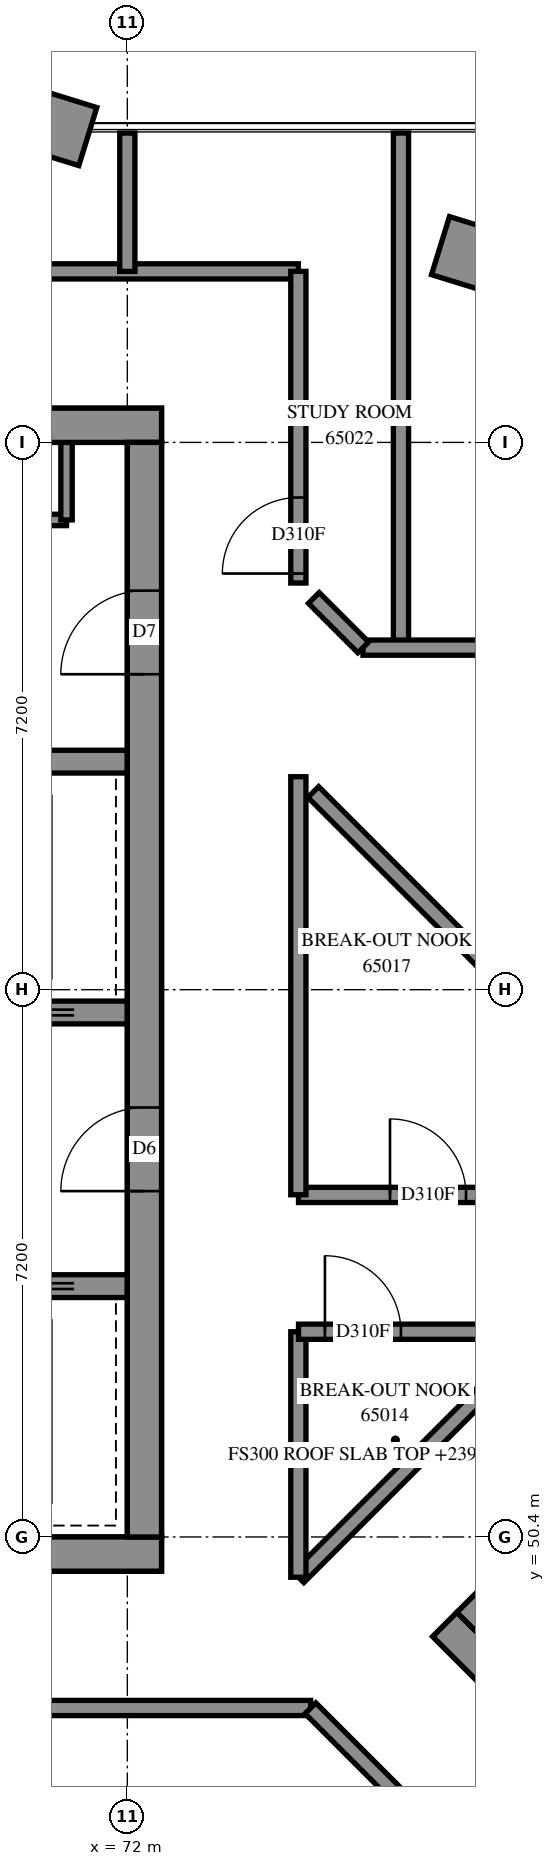
"""IFC4 building model, lengths in metres.
Left out: names, types, materials, properties, quantities, classifications, styles, units other than length and angle.
Written with IfcOpenShell. Run it as: python <this file> out.ifc"""

import sys

from ifc_helpers import new_model, si_unit, direction, frame, frame_2d, origin, place, context, subcontext, project, spatial, rectangle, extrude, element, fill, save


model = new_model("IFC4")
c1 = context("Model", 3, precision=1e-05, world=origin(), true_north=direction((0.0, 1.0)))
c2 = subcontext(c1, "Body", "Model", "MODEL_VIEW")
j1 = project(units=[si_unit("LENGTHUNIT", "METRE"), si_unit("PLANEANGLEUNIT", "RADIAN")], contexts=[c1])
p1 = place(None, origin())
s1 = spatial("IfcSite", under=j1, at=p1, CompositionType="ELEMENT")
p2 = place(p1, origin())
s2 = spatial("IfcBuilding", under=s1, at=p2, CompositionType="ELEMENT")
p3 = place(p2, frame((0.0, 0.0, 239.6)))
s3 = spatial("IfcBuildingStorey", under=s2, at=p3, CompositionType="ELEMENT", Elevation=239.6)
p4 = place(p3, frame((57.15, 50.175, -0.3), z_axis=(0.0, 0.0, 1.0), x_axis=(1.0, 0.0, 0.0)))
e1 = element("IfcWall", 1, at=p4, inside=s3, PredefinedType="SHEAR", context=c2, shape_type="SweptSolid", body=[
    extrude(rectangle(XDim=15.3, YDim=0.45, at=frame_2d((7.65, 0.0))), origin(), (0.0, 0.0, 1.0), 3.5),
])
p5 = place(p3, frame((57.15, 65.025, -0.3), z_axis=(0.0, 0.0, 1.0), x_axis=(1.0, 0.0, 0.0)))
e2 = element("IfcWall", 2, at=p5, inside=s3, PredefinedType="SHEAR", context=c2, shape_type="SweptSolid", body=[
    extrude(rectangle(XDim=15.3, YDim=0.45, at=frame_2d((7.65, 0.0))), origin(), (0.0, 0.0, 1.0), 3.5),
])
p6 = place(p5, frame((10.45, 0.0, 0.3)))
e3 = element("IfcOpeningElement", 3, at=p6, cuts=e2, PredefinedType="OPENING", context=c2, shape_type="SweptSolid", body=[
    extrude(rectangle(XDim=0.8, YDim=2.1, at=frame_2d((0.4, 1.05))), frame((0.0, 0.235, 0.0), z_axis=(0.0, -1.0, 0.0), x_axis=(1.0, 0.0, 0.0)), (0.0, 0.0, 1.0), 0.47),
])
p7 = place(p3, frame((72.225, 50.4, -0.3), z_axis=(0.0, 0.0, 1.0), x_axis=(0.0, 1.0, 0.0)))
e4 = element("IfcWall", 4, at=p7, inside=s3, PredefinedType="SHEAR", context=c2, shape_type="SweptSolid", body=[
    extrude(rectangle(XDim=14.4, YDim=0.45, at=frame_2d((7.2, 0.0))), origin(), (0.0, 0.0, 1.0), 3.5),
])
p8 = place(p7, frame((4.55, 0.0, 0.3)))
e5 = element("IfcOpeningElement", 5, at=p8, cuts=e4, PredefinedType="OPENING", context=c2, shape_type="SweptSolid", body=[
    extrude(rectangle(XDim=1.1, YDim=2.1, at=frame_2d((0.55, 1.05))), frame((0.0, 0.235, 0.0), z_axis=(0.0, -1.0, 0.0), x_axis=(1.0, 0.0, 0.0)), (0.0, 0.0, 1.0), 0.47),
])
p9 = place(p7, frame((11.35, 0.0, 0.3)))
e6 = element("IfcOpeningElement", 6, at=p9, cuts=e4, PredefinedType="OPENING", context=c2, shape_type="SweptSolid", body=[
    extrude(rectangle(XDim=1.1, YDim=2.1, at=frame_2d((0.55, 1.05))), frame((0.0, 0.235, 0.0), z_axis=(0.0, -1.0, 0.0), x_axis=(1.0, 0.0, 0.0)), (0.0, 0.0, 1.0), 0.47),
])
p10 = place(p3, frame((57.6, 53.7, 0.0), z_axis=(0.0, 0.0, 1.0), x_axis=(1.0, 0.0, 0.0)))
e7 = element("IfcWall", 7, at=p10, inside=s3, PredefinedType="SOLIDWALL", context=c2, shape_type="SweptSolid", body=[
    extrude(rectangle(XDim=14.4, YDim=0.3, at=frame_2d((7.2, 0.0))), origin(), (0.0, 0.0, 1.0), 3.9),
])
p11 = place(p10, frame((1.35, 0.0, 0.0)))
e8 = element("IfcOpeningElement", 8, at=p11, cuts=e7, PredefinedType="OPENING", context=c2, shape_type="SweptSolid", body=[
    extrude(rectangle(XDim=0.9, YDim=2.1, at=frame_2d((0.45, 1.05))), frame((0.0, 0.16, 0.0), z_axis=(0.0, -1.0, 0.0), x_axis=(1.0, 0.0, 0.0)), (0.0, 0.0, 1.0), 0.32),
])
p12 = place(p10, frame((4.95, 0.0, 0.0)))
e9 = element("IfcOpeningElement", 9, at=p12, cuts=e7, PredefinedType="OPENING", context=c2, shape_type="SweptSolid", body=[
    extrude(rectangle(XDim=0.9, YDim=2.1, at=frame_2d((0.45, 1.05))), frame((0.0, 0.16, 0.0), z_axis=(0.0, -1.0, 0.0), x_axis=(1.0, 0.0, 0.0)), (0.0, 0.0, 1.0), 0.32),
])
p13 = place(p10, frame((8.55, 0.0, 0.0)))
e10 = element("IfcOpeningElement", 10, at=p13, cuts=e7, PredefinedType="OPENING", context=c2, shape_type="SweptSolid", body=[
    extrude(rectangle(XDim=0.9, YDim=2.1, at=frame_2d((0.45, 1.05))), frame((0.0, 0.16, 0.0), z_axis=(0.0, -1.0, 0.0), x_axis=(1.0, 0.0, 0.0)), (0.0, 0.0, 1.0), 0.32),
])
p14 = place(p10, frame((12.05, 0.0, 0.0)))
e11 = element("IfcOpeningElement", 11, at=p14, cuts=e7, PredefinedType="OPENING", context=c2, shape_type="SweptSolid", body=[
    extrude(rectangle(XDim=1.1, YDim=2.1, at=frame_2d((0.55, 1.05))), frame((0.0, 0.16, 0.0), z_axis=(0.0, -1.0, 0.0), x_axis=(1.0, 0.0, 0.0)), (0.0, 0.0, 1.0), 0.32),
])
p15 = place(p3, frame((57.6, 57.3, 0.0), z_axis=(0.0, 0.0, 1.0), x_axis=(1.0, 0.0, 0.0)))
e12 = element("IfcWall", 12, at=p15, inside=s3, PredefinedType="SOLIDWALL", context=c2, shape_type="SweptSolid", body=[
    extrude(rectangle(XDim=14.4, YDim=0.3, at=frame_2d((7.2, 0.0))), origin(), (0.0, 0.0, 1.0), 3.9),
])
p16 = place(p15, frame((1.25, 0.0, 0.0)))
e13 = element("IfcOpeningElement", 13, at=p16, cuts=e12, PredefinedType="OPENING", context=c2, shape_type="SweptSolid", body=[
    extrude(rectangle(XDim=1.1, YDim=2.1, at=frame_2d((0.55, 1.05))), frame((0.0, 0.16, 0.0), z_axis=(0.0, -1.0, 0.0), x_axis=(1.0, 0.0, 0.0)), (0.0, 0.0, 1.0), 0.32),
])
p17 = place(p15, frame((4.85, 0.0, 0.0)))
e14 = element("IfcOpeningElement", 14, at=p17, cuts=e12, PredefinedType="OPENING", context=c2, shape_type="SweptSolid", body=[
    extrude(rectangle(XDim=1.1, YDim=2.1, at=frame_2d((0.55, 1.05))), frame((0.0, 0.16, 0.0), z_axis=(0.0, -1.0, 0.0), x_axis=(1.0, 0.0, 0.0)), (0.0, 0.0, 1.0), 0.32),
])
p18 = place(p15, frame((12.05, 0.0, 0.0)))
e15 = element("IfcOpeningElement", 15, at=p18, cuts=e12, PredefinedType="OPENING", context=c2, shape_type="SweptSolid", body=[
    extrude(rectangle(XDim=1.1, YDim=2.1, at=frame_2d((0.55, 1.05))), frame((0.0, 0.16, 0.0), z_axis=(0.0, -1.0, 0.0), x_axis=(1.0, 0.0, 0.0)), (0.0, 0.0, 1.0), 0.32),
])
p19 = place(p3, frame((64.8, 60.6, 0.0), z_axis=(0.0, 0.0, 1.0), x_axis=(1.0, 0.0, 0.0)))
e16 = element("IfcWall", 16, at=p19, inside=s3, PredefinedType="SOLIDWALL", context=c2, shape_type="SweptSolid", body=[
    extrude(rectangle(XDim=7.2, YDim=0.3, at=frame_2d((3.6, 0.0))), origin(), (0.0, 0.0, 1.0), 3.9),
])
p20 = place(p3, frame((76.177, 49.249, -0.3), z_axis=(0.0, 0.0, 1.0), x_axis=(0.7071100491, -0.7071035132, 0.0)))
e17 = element("IfcWall", 17, at=p20, inside=s3, PredefinedType="SHEAR", context=c2, shape_type="SweptSolid", body=[
    extrude(rectangle(XDim=15.3, YDim=0.45, at=frame_2d((7.65, 0.0))), origin(), (0.0, 0.0, 1.0), 3.5),
])
p21 = place(p3, frame((76.495, 49.249, -0.3), z_axis=(0.0, 0.0, 1.0), x_axis=(0.7071067812, 0.7071067812, 0.0)))
e18 = element("IfcWall", 18, at=p21, inside=s3, PredefinedType="SHEAR", context=c2, shape_type="SweptSolid", body=[
    extrude(rectangle(XDim=14.4, YDim=0.45, at=frame_2d((7.2, 0.0))), origin(), (0.0, 0.0, 1.0), 3.5),
])
p22 = place(p21, frame((4.55, 0.0, 0.3)))
e19 = element("IfcOpeningElement", 19, at=p22, cuts=e18, PredefinedType="OPENING", context=c2, shape_type="SweptSolid", body=[
    extrude(rectangle(XDim=1.1, YDim=2.1, at=frame_2d((0.55, 1.05))), frame((0.0, 0.235, 0.0), z_axis=(0.0, -1.0, 0.0), x_axis=(1.0, 0.0, 0.0)), (0.0, 0.0, 1.0), 0.47),
])
p23 = place(p21, frame((11.35, 0.0, 0.3)))
e20 = element("IfcOpeningElement", 20, at=p23, cuts=e18, PredefinedType="OPENING", context=c2, shape_type="SweptSolid", body=[
    extrude(rectangle(XDim=1.1, YDim=2.1, at=frame_2d((0.55, 1.05))), frame((0.0, 0.235, 0.0), z_axis=(0.0, -1.0, 0.0), x_axis=(1.0, 0.0, 0.0)), (0.0, 0.0, 1.0), 0.47),
])
p24 = place(p3, frame((78.024, 66.8, 0.0), z_axis=(0.0, 0.0, 1.0), x_axis=(-0.9553580919, 0.2954503618, 0.0)))
e21 = element("IfcWall", 21, at=p24, inside=s3, PredefinedType="SOLIDWALL", context=c2, shape_type="SweptSolid", body=[
    extrude(rectangle(XDim=1.993, YDim=0.8, at=frame_2d((0.996, 0.0))), origin(), (0.0, 0.0, 1.0), 0.65),
])
p25 = place(p3, frame((71.48, 68.824, 0.0), z_axis=(0.0, 0.0, 1.0), x_axis=(-0.9553587294, 0.2954483004, 0.0)))
e22 = element("IfcWall", 22, at=p25, inside=s3, PredefinedType="SOLIDWALL", context=c2, shape_type="SweptSolid", body=[
    extrude(rectangle(XDim=4.919, YDim=0.8, at=frame_2d((2.46, 0.0))), origin(), (0.0, 0.0, 1.0), 0.65),
])
p26 = place(p3, frame((64.95, 63.78, 0.0), z_axis=(0.0, 0.0, 1.0), x_axis=(1.0, 0.0, 0.0)))
e23 = element("IfcWall", 23, at=p26, inside=s3, PredefinedType="PARTITIONING", context=c2, shape_type="SweptSolid", body=[
    extrude(rectangle(XDim=6.25, YDim=0.15, at=frame_2d((3.125, 0.0))), origin(), (0.0, 0.0, 1.0), 3.9),
])
p27 = place(p3, frame((71.2, 63.78, 0.0), z_axis=(0.0, 0.0, 1.0), x_axis=(0.0, 1.0, 0.0)))
e24 = element("IfcWall", 24, at=p27, inside=s3, PredefinedType="PARTITIONING", context=c2, shape_type="SweptSolid", body=[
    extrude(rectangle(XDim=1.02, YDim=0.15, at=frame_2d((0.51, 0.0))), origin(), (0.0, 0.0, 1.0), 3.9),
])
p28 = place(p3, frame((55.352, 48.15, 0.0), z_axis=(0.0, 0.0, 1.0), x_axis=(1.0, 0.0, 0.0)))
e25 = element("IfcWall", 25, at=p28, inside=s3, PredefinedType="PARTITIONING", context=c2, shape_type="SweptSolid", body=[
    extrude(rectangle(XDim=19.06, YDim=0.2, at=frame_2d((9.53, 0.0))), origin(), (0.0, 0.0, 1.0), 3.9),
])
p29 = place(p28, frame((11.608, 0.0, 0.0)))
e26 = element("IfcOpeningElement", 26, at=p29, cuts=e25, PredefinedType="OPENING", context=c2, shape_type="SweptSolid", body=[
    extrude(rectangle(XDim=1.0, YDim=2.1, at=frame_2d((0.5, 1.05))), frame((0.0, 0.11, 0.0), z_axis=(0.0, -1.0, 0.0), x_axis=(1.0, 0.0, 0.0)), (0.0, 0.0, 1.0), 0.22),
])
p30 = place(p3, frame((55.35, 67.05, 0.0), z_axis=(0.0, 0.0, 1.0), x_axis=(1.0, 0.0, 0.0)))
e27 = element("IfcWall", 27, at=p30, inside=s3, PredefinedType="PARTITIONING", context=c2, shape_type="SweptSolid", body=[
    extrude(rectangle(XDim=18.9, YDim=0.2, at=frame_2d((9.45, 0.0))), origin(), (0.0, 0.0, 1.0), 3.9),
])
p31 = place(p30, frame((9.733, 0.0, 0.0)))
e28 = element("IfcOpeningElement", 28, at=p31, cuts=e27, PredefinedType="OPENING", context=c2, shape_type="SweptSolid", body=[
    extrude(rectangle(XDim=1.0, YDim=2.1, at=frame_2d((0.5, 1.05))), frame((0.0, 0.11, 0.0), z_axis=(0.0, -1.0, 0.0), x_axis=(1.0, 0.0, 0.0)), (0.0, 0.0, 1.0), 0.22),
])
p32 = place(p3, frame((75.6, 62.1, 0.0), z_axis=(0.0, 0.0, 1.0), x_axis=(0.0, 1.0, 0.0)))
e29 = element("IfcWall", 29, at=p32, inside=s3, PredefinedType="PARTITIONING", context=c2, shape_type="SweptSolid", body=[
    extrude(rectangle(XDim=6.77, YDim=0.2, at=frame_2d((3.385, 0.0))), origin(), (0.0, 0.0, 1.0), 3.9),
])
p33 = place(p3, frame((74.252, 54.9, 0.0), z_axis=(0.0, 0.0, 1.0), x_axis=(1.0, 0.0, 0.0)))
e30 = element("IfcWall", 30, at=p33, inside=s3, PredefinedType="PARTITIONING", context=c2, shape_type="SweptSolid", body=[
    extrude(rectangle(XDim=5.5, YDim=0.2, at=frame_2d((2.75, 0.0))), origin(), (0.0, 0.0, 1.0), 3.9),
])
p34 = place(p33, frame((1.204, 0.0, 0.0)))
e31 = element("IfcOpeningElement", 31, at=p34, cuts=e30, PredefinedType="OPENING", context=c2, shape_type="SweptSolid", body=[
    extrude(rectangle(XDim=1.0, YDim=2.1, at=frame_2d((0.5, 1.05))), frame((0.0, 0.11, 0.0), z_axis=(0.0, -1.0, 0.0), x_axis=(1.0, 0.0, 0.0)), (0.0, 0.0, 1.0), 0.22),
])
p35 = place(p3, frame((74.25, 54.902, 0.0), z_axis=(0.0, 0.0, 1.0), x_axis=(0.0, 1.0, 0.0)))
e32 = element("IfcWall", 32, at=p35, inside=s3, PredefinedType="PARTITIONING", context=c2, shape_type="SweptSolid", body=[
    extrude(rectangle(XDim=5.5, YDim=0.2, at=frame_2d((2.75, 0.0))), origin(), (0.0, 0.0, 1.0), 3.9),
])
p36 = place(p3, frame((74.251, 49.87, 0.0), z_axis=(0.0, 0.0, 1.0), x_axis=(0.7071067812, 0.7071067812, 0.0)))
e33 = element("IfcWall", 33, at=p36, inside=s3, PredefinedType="PARTITIONING", context=c2, shape_type="SweptSolid", body=[
    extrude(rectangle(XDim=4.565, YDim=0.2, at=frame_2d((2.283, 0.0))), origin(), (0.0, 0.0, 1.0), 3.9),
])
p37 = place(p3, frame((74.447, 60.201, 0.0), z_axis=(0.0, 0.0, 1.0), x_axis=(0.7071067812, -0.7071067812, 0.0)))
e34 = element("IfcWall", 34, at=p37, inside=s3, PredefinedType="PARTITIONING", context=c2, shape_type="SweptSolid", body=[
    extrude(rectangle(XDim=4.384, YDim=0.2, at=frame_2d((2.192, 0.0))), origin(), (0.0, 0.0, 1.0), 3.9),
])
p38 = place(p3, frame((75.1, 62.1, 0.0), z_axis=(0.0, 0.0, 1.0), x_axis=(1.0, 0.0, 0.0)))
e35 = element("IfcWall", 35, at=p38, inside=s3, PredefinedType="PARTITIONING", context=c2, shape_type="SweptSolid", body=[
    extrude(rectangle(XDim=4.1, YDim=0.2, at=frame_2d((2.05, 0.0))), origin(), (0.0, 0.0, 1.0), 3.9),
])
p39 = place(p3, frame((74.25, 62.95, 0.0), z_axis=(0.0, 0.0, 1.0), x_axis=(0.0, 1.0, 0.0)))
e36 = element("IfcWall", 36, at=p39, inside=s3, PredefinedType="PARTITIONING", context=c2, shape_type="SweptSolid", body=[
    extrude(rectangle(XDim=4.1, YDim=0.2, at=frame_2d((2.05, 0.0))), origin(), (0.0, 0.0, 1.0), 3.9),
])
p40 = place(p39, frame((0.125, 0.0, 0.0)))
e37 = element("IfcOpeningElement", 37, at=p40, cuts=e36, PredefinedType="OPENING", context=c2, shape_type="SweptSolid", body=[
    extrude(rectangle(XDim=1.0, YDim=2.1, at=frame_2d((0.5, 1.05))), frame((0.0, 0.11, 0.0), z_axis=(0.0, -1.0, 0.0), x_axis=(1.0, 0.0, 0.0)), (0.0, 0.0, 1.0), 0.22),
])
p41 = place(p3, frame((74.25, 49.87, 0.0), z_axis=(0.0, 0.0, 1.0), x_axis=(0.0, 1.0, 0.0)))
e38 = element("IfcWall", 38, at=p41, inside=s3, PredefinedType="PARTITIONING", context=c2, shape_type="SweptSolid", body=[
    extrude(rectangle(XDim=3.23, YDim=0.2, at=frame_2d((1.615, 0.0))), origin(), (0.0, 0.0, 1.0), 3.9),
])
p42 = place(p3, frame((74.252, 53.1, 0.0), z_axis=(0.0, 0.0, 1.0), x_axis=(1.0, 0.0, 0.0)))
e39 = element("IfcWall", 39, at=p42, inside=s3, PredefinedType="PARTITIONING", context=c2, shape_type="SweptSolid", body=[
    extrude(rectangle(XDim=3.228, YDim=0.2, at=frame_2d((1.614, 0.0))), origin(), (0.0, 0.0, 1.0), 3.9),
])
p43 = place(p42, frame((0.347, 0.0, 0.0)))
e40 = element("IfcOpeningElement", 40, at=p43, cuts=e39, PredefinedType="OPENING", context=c2, shape_type="SweptSolid", body=[
    extrude(rectangle(XDim=1.0, YDim=2.1, at=frame_2d((0.5, 1.05))), frame((0.0, 0.11, 0.0), z_axis=(0.0, -1.0, 0.0), x_axis=(1.0, 0.0, 0.0)), (0.0, 0.0, 1.0), 0.22),
])
p44 = place(p3, frame((74.409, 48.147, 0.0), z_axis=(0.0, 0.0, 1.0), x_axis=(0.7071067812, -0.7071067812, 0.0)))
e41 = element("IfcWall", 41, at=p44, inside=s3, PredefinedType="PARTITIONING", context=c2, shape_type="SweptSolid", body=[
    extrude(rectangle(XDim=2.574, YDim=0.2, at=frame_2d((1.287, 0.0))), origin(), (0.0, 0.0, 1.0), 3.9),
])
p45 = place(p3, frame((72.0, 67.05, 0.0), z_axis=(0.0, 0.0, 1.0), x_axis=(0.0, 1.0, 0.0)))
e42 = element("IfcWall", 42, at=p45, inside=s3, PredefinedType="PARTITIONING", context=c2, shape_type="SweptSolid", body=[
    extrude(rectangle(XDim=1.82, YDim=0.2, at=frame_2d((0.91, 0.0))), origin(), (0.0, 0.0, 1.0), 3.9),
])
p46 = place(p3, frame((74.454, 62.754, 0.0), z_axis=(0.0, 0.0, 1.0), x_axis=(0.7071067812, -0.7071067812, 0.0)))
e43 = element("IfcWall", 43, at=p46, inside=s3, PredefinedType="PARTITIONING", context=c2, shape_type="SweptSolid", body=[
    extrude(rectangle(XDim=0.919, YDim=0.2, at=frame_2d((0.46, 0.0))), origin(), (0.0, 0.0, 1.0), 3.9),
])
p47 = place(p8, origin())
e44 = element("IfcDoor", 44, at=p47, inside=s3, OperationType="DOUBLE_DOOR_SINGLE_SWING", PredefinedType="DOOR", context=c2, shape_type="SweptSolid", body=[
    extrude(rectangle(XDim=1.1, YDim=2.1, at=frame_2d((0.55, 1.05))), frame((0.0, 0.025, 0.0), z_axis=(0.0, -1.0, 0.0), x_axis=(1.0, 0.0, 0.0)), (0.0, 0.0, 1.0), 0.05),
])
fill(e5, e44)
p48 = place(p9, origin())
e45 = element("IfcDoor", 45, at=p48, inside=s3, OperationType="SINGLE_SWING_RIGHT", PredefinedType="DOOR", context=c2, shape_type="SweptSolid", body=[
    extrude(rectangle(XDim=1.1, YDim=2.1, at=frame_2d((0.55, 1.05))), frame((0.0, 0.025, 0.0), z_axis=(0.0, -1.0, 0.0), x_axis=(1.0, 0.0, 0.0)), (0.0, 0.0, 1.0), 0.05),
])
fill(e6, e45)
p49 = place(p43, origin())
e46 = element("IfcDoor", 46, at=p49, inside=s3, OperationType="SINGLE_SWING_RIGHT", PredefinedType="DOOR", context=c2, shape_type="SweptSolid", body=[
    extrude(rectangle(XDim=1.0, YDim=2.1, at=frame_2d((0.5, 1.05))), frame((0.0, 0.025, 0.0), z_axis=(0.0, -1.0, 0.0), x_axis=(1.0, 0.0, 0.0)), (0.0, 0.0, 1.0), 0.05),
])
fill(e40, e46)
p50 = place(p34, origin())
e47 = element("IfcDoor", 47, at=p50, inside=s3, OperationType="SINGLE_SWING_LEFT", PredefinedType="DOOR", context=c2, shape_type="SweptSolid", body=[
    extrude(rectangle(XDim=1.0, YDim=2.1, at=frame_2d((0.5, 1.05))), frame((0.0, 0.025, 0.0), z_axis=(0.0, -1.0, 0.0), x_axis=(1.0, 0.0, 0.0)), (0.0, 0.0, 1.0), 0.05),
])
fill(e31, e47)
p51 = place(p40, origin())
e48 = element("IfcDoor", 48, at=p51, inside=s3, OperationType="SINGLE_SWING_RIGHT", PredefinedType="DOOR", context=c2, shape_type="SweptSolid", body=[
    extrude(rectangle(XDim=1.0, YDim=2.1, at=frame_2d((0.5, 1.05))), frame((0.0, 0.025, 0.0), z_axis=(0.0, -1.0, 0.0), x_axis=(1.0, 0.0, 0.0)), (0.0, 0.0, 1.0), 0.05),
])
fill(e37, e48)
save(model, sys.argv[1])
